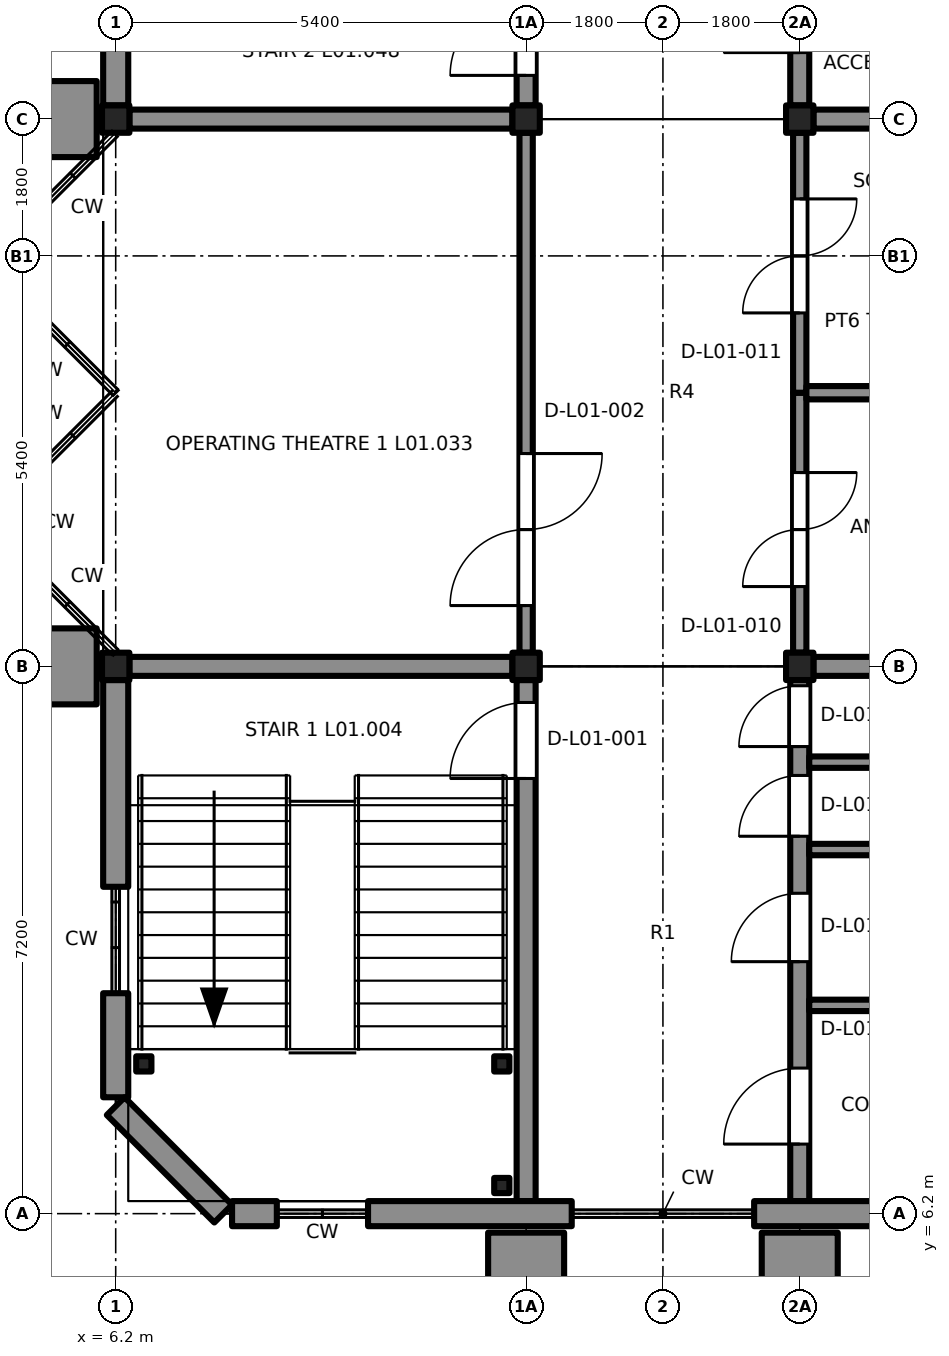
"""IFC4 building model, lengths in metres.
Left out: names, types, materials, properties, quantities, classifications, styles, units other than length and angle.
Written with IfcOpenShell. Run it as: python <this file> out.ifc"""

import sys

from ifc_helpers import new_model, si_unit, direction, frame, frame_2d, origin, origin_2d, place, context, subcontext, project, spatial, rectangle, extrude, element, fill, save


model = new_model("IFC4")
c1 = context("Model", 3, precision=1e-05, world=origin(), true_north=direction((0.0, 1.0)))
c2 = subcontext(c1, "Body", "Model", "MODEL_VIEW")
j1 = project(units=[si_unit("LENGTHUNIT", "METRE"), si_unit("PLANEANGLEUNIT", "RADIAN")], contexts=[c1])
p1 = place(None, origin())
s1 = spatial("IfcSite", under=j1, at=p1, CompositionType="ELEMENT")
p2 = place(p1, origin())
s2 = spatial("IfcBuilding", under=s1, at=p2, CompositionType="ELEMENT")
p3 = place(p2, frame((0.0, 0.0, 6.3)))
s3 = spatial("IfcBuildingStorey", under=s2, at=p3, CompositionType="ELEMENT", Elevation=6.3)
for number, where, z_axis, x_axis in (
    (1, (6.2, 13.4, 0.0), (0.0, 0.0, 1.0), (1.0, 0.0, 0.0)),
    (2, (11.6, 13.4, 0.0), (0.0, 0.0, 1.0), (1.0, 0.0, 0.0)),
    (3, (15.2, 13.4, 0.0), (0.0, 0.0, 1.0), (1.0, 0.0, 0.0)),
    (4, (6.2, 20.6, 0.0), (0.0, 0.0, 1.0), (1.0, 0.0, 0.0)),
    (5, (11.6, 20.6, 0.0), (0.0, 0.0, 1.0), (1.0, 0.0, 0.0)),
    (6, (15.2, 20.6, 0.0), (0.0, 0.0, 1.0), (1.0, 0.0, 0.0)),
):
    element("IfcColumn", number, at=place(p3, frame(where, z_axis=z_axis, x_axis=x_axis)), inside=s3, PredefinedType="COLUMN", context=c2, shape_type="SweptSolid", body=[
        extrude(rectangle(XDim=0.36, YDim=0.36, at=origin_2d()), origin(), (0.0, 0.0, 1.0), 3.9),
    ])
p4 = place(p3, frame((11.6, 6.365, 0.0), z_axis=(0.0, 0.0, 1.0), x_axis=(0.0, 1.0, 0.0)))
e7 = element("IfcWall", 7, at=p4, inside=s3, PredefinedType="SHEAR", context=c2, shape_type="SweptSolid", body=[
    extrude(rectangle(XDim=6.855, YDim=0.25, at=frame_2d((3.427, 0.0))), origin(), (0.0, 0.0, 1.0), 3.65),
])
p5 = place(p4, frame((5.56, 0.0, 0.0)))
e8 = element("IfcOpeningElement", 8, at=p5, cuts=e7, PredefinedType="OPENING", context=c2, shape_type="SweptSolid", body=[
    extrude(rectangle(XDim=1.0, YDim=2.1, at=frame_2d((0.5, 1.05))), frame((0.0, 0.135, 0.0), z_axis=(0.0, -1.0, 0.0), x_axis=(1.0, 0.0, 0.0)), (0.0, 0.0, 1.0), 0.27),
])
p6 = place(p3, frame((6.38, 13.4, 0.0), z_axis=(0.0, 0.0, 1.0), x_axis=(1.0, 0.0, 0.0)))
e9 = element("IfcWall", 9, at=p6, inside=s3, PredefinedType="SHEAR", context=c2, shape_type="SweptSolid", body=[
    extrude(rectangle(XDim=5.04, YDim=0.25, at=frame_2d((2.52, 0.0))), origin(), (0.0, 0.0, 1.0), 3.65),
])
p7 = place(p3, frame((15.2, 6.365, 0.0), z_axis=(0.0, 0.0, 1.0), x_axis=(0.0, 1.0, 0.0)))
e10 = element("IfcWall", 10, at=p7, inside=s3, PredefinedType="SHEAR", context=c2, shape_type="SweptSolid", body=[
    extrude(rectangle(XDim=6.855, YDim=0.25, at=frame_2d((3.427, 0.0))), origin(), (0.0, 0.0, 1.0), 3.65),
])
p8 = place(p7, frame((0.75, 0.0, 0.0)))
e11 = element("IfcOpeningElement", 11, at=p8, cuts=e10, PredefinedType="OPENING", context=c2, shape_type="SweptSolid", body=[
    extrude(rectangle(XDim=1.0, YDim=2.1, at=frame_2d((0.5, 1.05))), frame((0.0, 0.135, 0.0), z_axis=(0.0, -1.0, 0.0), x_axis=(1.0, 0.0, 0.0)), (0.0, 0.0, 1.0), 0.27),
])
p9 = place(p7, frame((3.15, 0.0, 0.0)))
e12 = element("IfcOpeningElement", 12, at=p9, cuts=e10, PredefinedType="OPENING", context=c2, shape_type="SweptSolid", body=[
    extrude(rectangle(XDim=0.9, YDim=2.1, at=frame_2d((0.45, 1.05))), frame((0.0, 0.135, 0.0), z_axis=(0.0, -1.0, 0.0), x_axis=(1.0, 0.0, 0.0)), (0.0, 0.0, 1.0), 0.27),
])
p10 = place(p7, frame((4.8, 0.0, 0.0)))
e13 = element("IfcOpeningElement", 13, at=p10, cuts=e10, PredefinedType="OPENING", context=c2, shape_type="SweptSolid", body=[
    extrude(rectangle(XDim=0.8, YDim=2.1, at=frame_2d((0.4, 1.05))), frame((0.0, 0.135, 0.0), z_axis=(0.0, -1.0, 0.0), x_axis=(1.0, 0.0, 0.0)), (0.0, 0.0, 1.0), 0.27),
])
p11 = place(p7, frame((5.98, 0.0, 0.0)))
e14 = element("IfcOpeningElement", 14, at=p11, cuts=e10, PredefinedType="OPENING", context=c2, shape_type="SweptSolid", body=[
    extrude(rectangle(XDim=0.8, YDim=2.1, at=frame_2d((0.4, 1.05))), frame((0.0, 0.135, 0.0), z_axis=(0.0, -1.0, 0.0), x_axis=(1.0, 0.0, 0.0)), (0.0, 0.0, 1.0), 0.27),
])
p12 = place(p3, frame((15.38, 13.4, 0.0), z_axis=(0.0, 0.0, 1.0), x_axis=(1.0, 0.0, 0.0)))
e15 = element("IfcWall", 15, at=p12, inside=s3, PredefinedType="SHEAR", context=c2, shape_type="SweptSolid", body=[
    extrude(rectangle(XDim=5.04, YDim=0.25, at=frame_2d((2.52, 0.0))), origin(), (0.0, 0.0, 1.0), 3.65),
])
for number, where, z_axis, x_axis in (
    (16, (15.325, 8.94, 0.0), (0.0, 0.0, 1.0), (1.0, 0.0, 0.0)),
    (17, (15.325, 10.99, 0.0), (0.0, 0.0, 1.0), (1.0, 0.0, 0.0)),
    (18, (15.325, 12.14, 0.0), (0.0, 0.0, 1.0), (1.0, 0.0, 0.0)),
):
    element("IfcWall", number, at=place(p3, frame(where, z_axis=z_axis, x_axis=x_axis)), inside=s3, PredefinedType="PARTITIONING", context=c2, shape_type="SweptSolid", body=[
        extrude(rectangle(XDim=5.11, YDim=0.15, at=frame_2d((2.555, 0.0))), origin(), (0.0, 0.0, 1.0), 3.65),
    ])
for number, where, z_axis, x_axis in (
    (19, (11.28, 6.57, 0.0), (0.0, 0.0, 1.0), (1.0, 0.0, 0.0)),
    (20, (6.57, 8.17, 0.0), (0.0, 0.0, 1.0), (1.0, 0.0, 0.0)),
    (21, (11.28, 8.17, 0.0), (0.0, 0.0, 1.0), (1.0, 0.0, 0.0)),
):
    element("IfcColumn", number, at=place(p3, frame(where, z_axis=z_axis, x_axis=x_axis)), inside=s3, PredefinedType="COLUMN", context=c2, shape_type="SweptSolid", body=[
        extrude(rectangle(XDim=0.2, YDim=0.2, at=origin_2d()), origin(), (0.0, 0.0, 1.0), 3.9),
    ])
p13 = place(p3, frame((11.6, 20.78, 0.0), z_axis=(0.0, 0.0, 1.0), x_axis=(0.0, 1.0, 0.0)))
e22 = element("IfcWall", 22, at=p13, inside=s3, PredefinedType="SHEAR", context=c2, shape_type="SweptSolid", body=[
    extrude(rectangle(XDim=6.84, YDim=0.25, at=frame_2d((3.42, 0.0))), origin(), (0.0, 0.0, 1.0), 3.65),
])
p14 = place(p13, frame((0.395, 0.0, 0.0)))
e23 = element("IfcOpeningElement", 23, at=p14, cuts=e22, PredefinedType="OPENING", context=c2, shape_type="SweptSolid", body=[
    extrude(rectangle(XDim=1.0, YDim=2.1, at=frame_2d((0.5, 1.05))), frame((0.0, 0.135, 0.0), z_axis=(0.0, -1.0, 0.0), x_axis=(1.0, 0.0, 0.0)), (0.0, 0.0, 1.0), 0.27),
])
p15 = place(p3, frame((6.38, 20.6, 0.0), z_axis=(0.0, 0.0, 1.0), x_axis=(1.0, 0.0, 0.0)))
e24 = element("IfcWall", 24, at=p15, inside=s3, PredefinedType="SHEAR", context=c2, shape_type="SweptSolid", body=[
    extrude(rectangle(XDim=5.04, YDim=0.25, at=frame_2d((2.52, 0.0))), origin(), (0.0, 0.0, 1.0), 3.65),
])
p16 = place(p3, frame((15.2, 20.78, 0.0), z_axis=(0.0, 0.0, 1.0), x_axis=(0.0, 1.0, 0.0)))
e25 = element("IfcWall", 25, at=p16, inside=s3, PredefinedType="SHEAR", context=c2, shape_type="SweptSolid", body=[
    extrude(rectangle(XDim=6.84, YDim=0.25, at=frame_2d((3.42, 0.0))), origin(), (0.0, 0.0, 1.0), 3.65),
])
p17 = place(p16, frame((0.695, 0.0, 0.0)))
e26 = element("IfcOpeningElement", 26, at=p17, cuts=e25, PredefinedType="OPENING", context=c2, shape_type="SweptSolid", body=[
    extrude(rectangle(XDim=1.0, YDim=2.1, at=frame_2d((0.5, 1.05))), frame((0.0, 0.135, 0.0), z_axis=(0.0, -1.0, 0.0), x_axis=(1.0, 0.0, 0.0)), (0.0, 0.0, 1.0), 0.27),
])
p18 = place(p16, frame((3.095, 0.0, 0.0)))
e27 = element("IfcOpeningElement", 27, at=p18, cuts=e25, PredefinedType="OPENING", context=c2, shape_type="SweptSolid", body=[
    extrude(rectangle(XDim=0.9, YDim=2.1, at=frame_2d((0.45, 1.05))), frame((0.0, 0.135, 0.0), z_axis=(0.0, -1.0, 0.0), x_axis=(1.0, 0.0, 0.0)), (0.0, 0.0, 1.0), 0.27),
])
p19 = place(p16, frame((4.745, 0.0, 0.0)))
e28 = element("IfcOpeningElement", 28, at=p19, cuts=e25, PredefinedType="OPENING", context=c2, shape_type="SweptSolid", body=[
    extrude(rectangle(XDim=0.8, YDim=2.1, at=frame_2d((0.4, 1.05))), frame((0.0, 0.135, 0.0), z_axis=(0.0, -1.0, 0.0), x_axis=(1.0, 0.0, 0.0)), (0.0, 0.0, 1.0), 0.27),
])
p20 = place(p16, frame((5.945, 0.0, 0.0)))
e29 = element("IfcOpeningElement", 29, at=p20, cuts=e25, PredefinedType="OPENING", context=c2, shape_type="SweptSolid", body=[
    extrude(rectangle(XDim=0.8, YDim=2.1, at=frame_2d((0.4, 1.05))), frame((0.0, 0.135, 0.0), z_axis=(0.0, -1.0, 0.0), x_axis=(1.0, 0.0, 0.0)), (0.0, 0.0, 1.0), 0.27),
])
p21 = place(p3, frame((15.38, 20.6, 0.0), z_axis=(0.0, 0.0, 1.0), x_axis=(1.0, 0.0, 0.0)))
e30 = element("IfcWall", 30, at=p21, inside=s3, PredefinedType="SHEAR", context=c2, shape_type="SweptSolid", body=[
    extrude(rectangle(XDim=5.04, YDim=0.25, at=frame_2d((2.52, 0.0))), origin(), (0.0, 0.0, 1.0), 3.65),
])
p22 = place(p3, frame((6.2, 7.731, 0.0), z_axis=(0.0, 0.0, 1.0), x_axis=(0.0, 1.0, 0.0)))
e31 = element("IfcWall", 31, at=p22, inside=s3, PredefinedType="SOLIDWALL", context=c2, shape_type="SweptSolid", body=[
    extrude(rectangle(XDim=1.369, YDim=0.33, at=frame_2d((0.685, 0.0))), origin(), (0.0, 0.0, 1.0), 3.22),
])
for number, where, z_axis, x_axis in (
    (32, (6.2, 10.5, 0.0), (0.0, 0.0, 1.0), (0.0, 1.0, 0.0)),
    (33, (6.2, 20.78, 0.0), (0.0, 0.0, 1.0), (0.0, 1.0, 0.0)),
):
    element("IfcWall", number, at=place(p3, frame(where, z_axis=z_axis, x_axis=x_axis)), inside=s3, PredefinedType="SOLIDWALL", context=c2, shape_type="SweptSolid", body=[
        extrude(rectangle(XDim=2.72, YDim=0.33, at=frame_2d((1.36, 0.0))), origin(), (0.0, 0.0, 1.0), 3.22),
    ])
for number, where, z_axis, x_axis in (
    (34, (5.575, 12.9, 0.0), (0.0, 0.0, 1.0), (0.0, 1.0, 0.0)),
    (35, (5.575, 20.1, 0.0), (0.0, 0.0, 1.0), (0.0, 1.0, 0.0)),
):
    element("IfcWall", number, at=place(p3, frame(where, z_axis=z_axis, x_axis=x_axis)), inside=s3, PredefinedType="SOLIDWALL", context=c2, shape_type="SweptSolid", body=[
        extrude(rectangle(XDim=1.0, YDim=0.75, at=frame_2d((0.5, 0.0))), origin(), (0.0, 0.0, 1.0), 3.9),
    ])
p23 = place(p3, frame((8.32, 6.2, 0.0), z_axis=(0.0, 0.0, 1.0), x_axis=(-1.0, 0.0, 0.0)))
e36 = element("IfcWall", 36, at=p23, inside=s3, PredefinedType="SOLIDWALL", context=c2, shape_type="SweptSolid", body=[
    extrude(rectangle(XDim=0.589, YDim=0.33, at=frame_2d((0.294, 0.0))), origin(), (0.0, 0.0, 1.0), 3.2),
])
p24 = place(p3, frame((12.2, 6.2, 0.0), z_axis=(0.0, 0.0, 1.0), x_axis=(-1.0, 0.0, 0.0)))
e37 = element("IfcWall", 37, at=p24, inside=s3, PredefinedType="SOLIDWALL", context=c2, shape_type="SweptSolid", body=[
    extrude(rectangle(XDim=2.68, YDim=0.33, at=frame_2d((1.34, 0.0))), origin(), (0.0, 0.0, 1.0), 3.2),
])
p25 = place(p3, frame((20.435, 6.2, 0.0), z_axis=(0.0, 0.0, 1.0), x_axis=(-1.0, 0.0, 0.0)))
e38 = element("IfcWall", 38, at=p25, inside=s3, PredefinedType="SOLIDWALL", context=c2, shape_type="SweptSolid", body=[
    extrude(rectangle(XDim=5.835, YDim=0.33, at=frame_2d((2.917, 0.0))), origin(), (0.0, 0.0, 1.0), 3.2),
])
for number, where, z_axis, x_axis in (
    (39, (12.1, 5.575, 0.0), (0.0, 0.0, 1.0), (-1.0, 0.0, 0.0)),
    (40, (15.7, 5.575, 0.0), (0.0, 0.0, 1.0), (-1.0, 0.0, 0.0)),
):
    element("IfcWall", number, at=place(p3, frame(where, z_axis=z_axis, x_axis=x_axis)), inside=s3, PredefinedType="SOLIDWALL", context=c2, shape_type="SweptSolid", body=[
        extrude(rectangle(XDim=1.0, YDim=0.75, at=frame_2d((0.5, 0.0))), origin(), (0.0, 0.0, 1.0), 3.9),
    ])
p26 = place(p3, frame((6.2, 7.614, 0.0), z_axis=(0.0, 0.0, 1.0), x_axis=(0.707106781187, -0.707106781187, 0.0)))
e41 = element("IfcWall", 41, at=p26, inside=s3, PredefinedType="SOLIDWALL", context=c2, shape_type="SweptSolid", body=[
    extrude(rectangle(XDim=2.0, YDim=0.33, at=frame_2d((1.0, 0.0))), origin(), (0.0, 0.0, 1.0), 3.2),
])
p27 = place(p3, frame((11.6, 13.58, 0.0), z_axis=(0.0, 0.0, 1.0), x_axis=(0.0, 1.0, 0.0)))
e42 = element("IfcWall", 42, at=p27, inside=s3, PredefinedType="PARTITIONING", context=c2, shape_type="SweptSolid", body=[
    extrude(rectangle(XDim=6.84, YDim=0.175, at=frame_2d((3.42, 0.0))), origin(), (0.0, 0.0, 1.0), 3.22),
])
p28 = place(p27, frame((0.62, 0.0, 0.0)))
e43 = element("IfcOpeningElement", 43, at=p28, cuts=e42, PredefinedType="OPENING", context=c2, shape_type="SweptSolid", body=[
    extrude(rectangle(XDim=2.0, YDim=2.4, at=frame_2d((1.0, 1.2))), frame((0.0, 0.097, 0.0), z_axis=(0.0, -1.0, 0.0), x_axis=(1.0, 0.0, 0.0)), (0.0, 0.0, 1.0), 0.195),
])
p29 = place(p3, frame((15.2, 17.0, 0.0), z_axis=(0.0, 0.0, 1.0), x_axis=(0.0, -1.0, 0.0)))
e44 = element("IfcWall", 44, at=p29, inside=s3, PredefinedType="PARTITIONING", context=c2, shape_type="SweptSolid", body=[
    extrude(rectangle(XDim=3.42, YDim=0.175, at=frame_2d((1.71, 0.0))), origin(), (0.0, 0.0, 1.0), 3.22),
])
p30 = place(p29, frame((1.05, 0.0, 0.0)))
e45 = element("IfcOpeningElement", 45, at=p30, cuts=e44, PredefinedType="OPENING", context=c2, shape_type="SweptSolid", body=[
    extrude(rectangle(XDim=1.5, YDim=2.1, at=frame_2d((0.75, 1.05))), frame((0.0, 0.097, 0.0), z_axis=(0.0, -1.0, 0.0), x_axis=(1.0, 0.0, 0.0)), (0.0, 0.0, 1.0), 0.195),
])
p31 = place(p3, frame((15.2, 20.42, 0.0), z_axis=(0.0, 0.0, 1.0), x_axis=(0.0, -1.0, 0.0)))
e46 = element("IfcWall", 46, at=p31, inside=s3, PredefinedType="PARTITIONING", context=c2, shape_type="SweptSolid", body=[
    extrude(rectangle(XDim=3.42, YDim=0.175, at=frame_2d((1.71, 0.0))), origin(), (0.0, 0.0, 1.0), 3.22),
])
p32 = place(p31, frame((0.87, 0.0, 0.0)))
e47 = element("IfcOpeningElement", 47, at=p32, cuts=e46, PredefinedType="OPENING", context=c2, shape_type="SweptSolid", body=[
    extrude(rectangle(XDim=1.5, YDim=2.1, at=frame_2d((0.75, 1.05))), frame((0.0, 0.097, 0.0), z_axis=(0.0, -1.0, 0.0), x_axis=(1.0, 0.0, 0.0)), (0.0, 0.0, 1.0), 0.195),
])
p33 = place(p3, frame((20.435, 17.0, 0.0), z_axis=(0.0, 0.0, 1.0), x_axis=(-1.0, 0.0, 0.0)))
e48 = element("IfcWall", 48, at=p33, inside=s3, PredefinedType="PARTITIONING", context=c2, shape_type="SweptSolid", body=[
    extrude(rectangle(XDim=5.147, YDim=0.175, at=frame_2d((2.574, 0.0))), origin(), (0.0, 0.0, 1.0), 3.38),
])
p34 = place(p5, origin())
e49 = element("IfcDoor", 49, at=p34, inside=s3, OperationType="SINGLE_SWING_LEFT", PredefinedType="DOOR", context=c2, shape_type="SweptSolid", body=[
    extrude(rectangle(XDim=1.0, YDim=2.1, at=frame_2d((0.5, 1.05))), frame((0.0, 0.025, 0.0), z_axis=(0.0, -1.0, 0.0), x_axis=(1.0, 0.0, 0.0)), (0.0, 0.0, 1.0), 0.05),
])
fill(e8, e49)
p35 = place(p8, origin())
e50 = element("IfcDoor", 50, at=p35, inside=s3, OperationType="SINGLE_SWING_LEFT", PredefinedType="DOOR", context=c2, shape_type="SweptSolid", body=[
    extrude(rectangle(XDim=1.0, YDim=2.1, at=frame_2d((0.5, 1.05))), frame((0.0, 0.025, 0.0), z_axis=(0.0, -1.0, 0.0), x_axis=(1.0, 0.0, 0.0)), (0.0, 0.0, 1.0), 0.05),
])
fill(e11, e50)
p36 = place(p9, origin())
e51 = element("IfcDoor", 51, at=p36, inside=s3, OperationType="SINGLE_SWING_LEFT", PredefinedType="DOOR", context=c2, shape_type="SweptSolid", body=[
    extrude(rectangle(XDim=0.9, YDim=2.1, at=frame_2d((0.45, 1.05))), frame((0.0, 0.025, 0.0), z_axis=(0.0, -1.0, 0.0), x_axis=(1.0, 0.0, 0.0)), (0.0, 0.0, 1.0), 0.05),
])
fill(e12, e51)
p37 = place(p10, origin())
e52 = element("IfcDoor", 52, at=p37, inside=s3, OperationType="SINGLE_SWING_LEFT", PredefinedType="DOOR", context=c2, shape_type="SweptSolid", body=[
    extrude(rectangle(XDim=0.8, YDim=2.1, at=frame_2d((0.4, 1.05))), frame((0.0, 0.025, 0.0), z_axis=(0.0, -1.0, 0.0), x_axis=(1.0, 0.0, 0.0)), (0.0, 0.0, 1.0), 0.05),
])
fill(e13, e52)
p38 = place(p11, origin())
e53 = element("IfcDoor", 53, at=p38, inside=s3, OperationType="SINGLE_SWING_LEFT", PredefinedType="DOOR", context=c2, shape_type="SweptSolid", body=[
    extrude(rectangle(XDim=0.8, YDim=2.1, at=frame_2d((0.4, 1.05))), frame((0.0, 0.025, 0.0), z_axis=(0.0, -1.0, 0.0), x_axis=(1.0, 0.0, 0.0)), (0.0, 0.0, 1.0), 0.05),
])
fill(e14, e53)
p39 = place(p14, origin())
e54 = element("IfcDoor", 54, at=p39, inside=s3, OperationType="SINGLE_SWING_RIGHT", PredefinedType="DOOR", context=c2, shape_type="SweptSolid", body=[
    extrude(rectangle(XDim=1.0, YDim=2.1, at=frame_2d((0.5, 1.05))), frame((0.0, 0.025, 0.0), z_axis=(0.0, -1.0, 0.0), x_axis=(1.0, 0.0, 0.0)), (0.0, 0.0, 1.0), 0.05),
])
fill(e23, e54)
p40 = place(p28, origin())
e55 = element("IfcDoor", 55, at=p40, inside=s3, OperationType="DOUBLE_DOOR_SINGLE_SWING", PredefinedType="DOOR", context=c2, shape_type="SweptSolid", body=[
    extrude(rectangle(XDim=2.0, YDim=2.4, at=frame_2d((1.0, 1.2))), frame((0.0, 0.025, 0.0), z_axis=(0.0, -1.0, 0.0), x_axis=(1.0, 0.0, 0.0)), (0.0, 0.0, 1.0), 0.05),
])
fill(e43, e55)
p41 = place(p30, origin())
e56 = element("IfcDoor", 56, at=p41, inside=s3, OperationType="DOUBLE_DOOR_SINGLE_SWING", PredefinedType="DOOR", context=c2, shape_type="SweptSolid", body=[
    extrude(rectangle(XDim=1.5, YDim=2.1, at=frame_2d((0.75, 1.05))), frame((0.0, 0.025, 0.0), z_axis=(0.0, -1.0, 0.0), x_axis=(1.0, 0.0, 0.0)), (0.0, 0.0, 1.0), 0.05),
])
fill(e45, e56)
p42 = place(p32, origin())
e57 = element("IfcDoor", 57, at=p42, inside=s3, OperationType="DOUBLE_DOOR_SINGLE_SWING", PredefinedType="DOOR", context=c2, shape_type="SweptSolid", body=[
    extrude(rectangle(XDim=1.5, YDim=2.1, at=frame_2d((0.75, 1.05))), frame((0.0, 0.025, 0.0), z_axis=(0.0, -1.0, 0.0), x_axis=(1.0, 0.0, 0.0)), (0.0, 0.0, 1.0), 0.05),
])
fill(e47, e57)
save(model, sys.argv[1])
